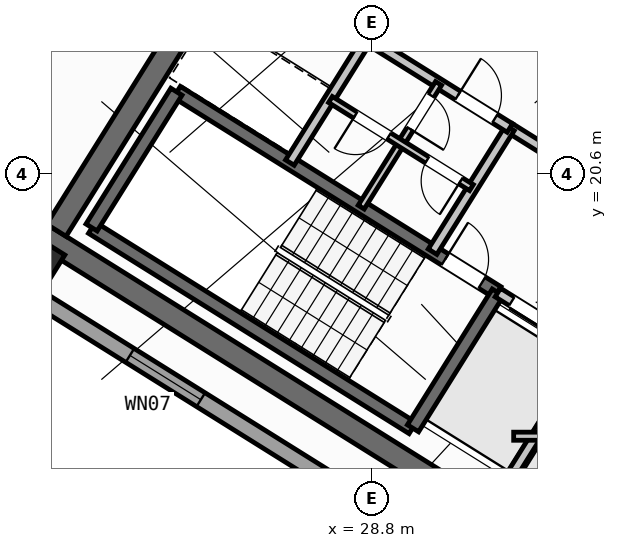
"""IFC4 building model, lengths in metres.
Left out: names, types, materials, properties, quantities, classifications, styles, units other than length and angle.
Written with IfcOpenShell. Run it as: python <this file> out.ifc"""

import sys

from ifc_helpers import new_model, si_unit, direction, frame, frame_2d, origin, origin_2d, place, context, subcontext, project, spatial, rectangle, hollow_rectangle, extrude, source, transform, mapped, element, fill, save


model = new_model("IFC4")
c1 = context("Model", 3, precision=1e-05, world=origin(), true_north=direction((0.0, 1.0)))
c2 = subcontext(c1, "Body", "Model", "MODEL_VIEW")
j1 = project(units=[si_unit("LENGTHUNIT", "METRE"), si_unit("PLANEANGLEUNIT", "RADIAN")], contexts=[c1])
p1 = place(None, origin())
s1 = spatial("IfcSite", under=j1, at=p1, CompositionType="ELEMENT")
p2 = place(p1, origin())
s2 = spatial("IfcBuilding", under=s1, at=p2, CompositionType="ELEMENT")
p3 = place(p2, frame((0.0, 0.0, 218.4)))
s3 = spatial("IfcBuildingStorey", under=s2, at=p3, CompositionType="ELEMENT", Elevation=218.4)
p4 = place(p3, frame((33.324, 12.503, 0.0), z_axis=(0.0, 0.0, 1.0), x_axis=(-0.848043529849, 0.529926571782, 0.0)))
e1 = element("IfcWall", 1, at=p4, inside=s3, PredefinedType="SHEAR", context=c2, shape_type="SweptSolid", body=[
    extrude(rectangle(XDim=13.04, YDim=0.45, at=frame_2d((6.52, 0.0))), origin(), (0.0, 0.0, 1.0), 3.35),
])
p5 = place(p3, frame((26.007, 24.976, 0.0), z_axis=(0.0, 0.0, 1.0), x_axis=(-0.529931155655, -0.848040665456, 0.0)))
e2 = element("IfcWall", 2, at=p5, inside=s3, PredefinedType="SHEAR", context=c2, shape_type="SweptSolid", body=[
    extrude(rectangle(XDim=6.475, YDim=0.45, at=frame_2d((3.238, 0.0))), origin(), (0.0, 0.0, 1.0), 3.35),
])
m1 = source(origin(), c2, "Body", "SweptSolid", [
    extrude(hollow_rectangle(XDim=0.8, YDim=0.8, WallThickness=0.032, at=origin_2d()), origin(), (0.0, 0.0, 1.0), 3.6),
])
p6 = place(p3, frame((22.191, 18.87, 0.0), z_axis=(0.0, 0.0, 1.0), x_axis=(-0.848048096156, 0.529919264233, 0.0)))
e3 = element("IfcColumn", 3, at=p6, inside=s3, PredefinedType="COLUMN", context=c2, shape_type="MappedRepresentation", body=[
    mapped(m1, transform((0.0, 0.0, 0.0), scale=1.0)),
])
p7 = place(p3, frame((31.76, 12.183, 0.0), z_axis=(0.0, 0.0, 1.0), x_axis=(-0.848047074256, 0.529920899612, 0.0)))
e4 = element("IfcWall", 4, at=p7, inside=s3, PredefinedType="STANDARD", context=c2, shape_type="SweptSolid", body=[
    extrude(rectangle(XDim=30.652, YDim=0.32, at=frame_2d((15.326, 0.0))), origin(), (0.0, 0.0, 1.0), 3.35),
])
p8 = place(p7, frame((15.166, 0.0, 0.0)))
e5 = element("IfcOpeningElement", 5, at=p8, cuts=e4, PredefinedType="OPENING", context=c2, shape_type="SweptSolid", body=[
    extrude(rectangle(XDim=1.2, YDim=2.15, at=frame_2d((0.6, 1.075))), frame((0.0, 0.17, 0.0), z_axis=(0.0, -1.0, 0.0), x_axis=(1.0, 0.0, 0.0)), (0.0, 0.0, 1.0), 0.34),
])
p9 = place(p7, frame((2.24, 0.0, 0.9)))
e6 = element("IfcOpeningElement", 6, at=p9, cuts=e4, PredefinedType="OPENING", context=c2, shape_type="SweptSolid", body=[
    extrude(rectangle(XDim=1.65, YDim=1.45, at=frame_2d((0.825, 0.725))), frame((0.0, 0.17, 0.0), z_axis=(0.0, -1.0, 0.0), x_axis=(1.0, 0.0, 0.0)), (0.0, 0.0, 1.0), 0.34),
])
p10 = place(p7, frame((7.469, 0.0, 0.9)))
e7 = element("IfcOpeningElement", 7, at=p10, cuts=e4, PredefinedType="OPENING", context=c2, shape_type="SweptSolid", body=[
    extrude(rectangle(XDim=1.65, YDim=1.45, at=frame_2d((0.825, 0.725))), frame((0.0, 0.17, 0.0), z_axis=(0.0, -1.0, 0.0), x_axis=(1.0, 0.0, 0.0)), (0.0, 0.0, 1.0), 0.34),
])
p11 = place(p7, frame((12.623, 0.0, 1.0)))
e8 = element("IfcOpeningElement", 8, at=p11, cuts=e4, PredefinedType="OPENING", context=c2, shape_type="SweptSolid", body=[
    extrude(rectangle(XDim=0.9, YDim=1.25, at=frame_2d((0.45, 0.625))), frame((0.0, 0.17, 0.0), z_axis=(0.0, -1.0, 0.0), x_axis=(1.0, 0.0, 0.0)), (0.0, 0.0, 1.0), 0.34),
])
p12 = place(p7, frame((19.583, 0.0, 1.0)))
e9 = element("IfcOpeningElement", 9, at=p12, cuts=e4, PredefinedType="OPENING", context=c2, shape_type="SweptSolid", body=[
    extrude(rectangle(XDim=0.9, YDim=1.25, at=frame_2d((0.45, 0.625))), frame((0.0, 0.17, 0.0), z_axis=(0.0, -1.0, 0.0), x_axis=(1.0, 0.0, 0.0)), (0.0, 0.0, 1.0), 0.34),
])
p13 = place(p7, frame((22.033, 0.0, 1.0)))
e10 = element("IfcOpeningElement", 10, at=p13, cuts=e4, PredefinedType="OPENING", context=c2, shape_type="SweptSolid", body=[
    extrude(rectangle(XDim=0.9, YDim=1.25, at=frame_2d((0.45, 0.625))), frame((0.0, 0.17, 0.0), z_axis=(0.0, -1.0, 0.0), x_axis=(1.0, 0.0, 0.0)), (0.0, 0.0, 1.0), 0.34),
])
p14 = place(p7, frame((27.666, 0.0, 0.9)))
e11 = element("IfcOpeningElement", 11, at=p14, cuts=e4, PredefinedType="OPENING", context=c2, shape_type="SweptSolid", body=[
    extrude(rectangle(XDim=1.35, YDim=1.45, at=frame_2d((0.675, 0.725))), frame((0.0, 0.17, 0.0), z_axis=(0.0, -1.0, 0.0), x_axis=(1.0, 0.0, 0.0)), (0.0, 0.0, 1.0), 0.34),
])
p15 = place(p3, frame((29.605, 15.581, 0.0), z_axis=(0.0, 0.0, 1.0), x_axis=(-0.848036911448, 0.529937163087, 0.0)))
e12 = element("IfcWall", 12, at=p15, inside=s3, PredefinedType="SHEAR", context=c2, shape_type="SweptSolid", body=[
    extrude(rectangle(XDim=7.46, YDim=0.26, at=frame_2d((3.73, 0.0))), origin(), (0.0, 0.0, 1.0), 3.35),
])
p16 = place(p3, frame((31.28, 18.261, 0.0), z_axis=(0.0, 0.0, 1.0), x_axis=(-0.848051618787, 0.529913626805, 0.0)))
e13 = element("IfcWall", 13, at=p16, inside=s3, PredefinedType="SHEAR", context=c2, shape_type="SweptSolid", body=[
    extrude(rectangle(XDim=7.46, YDim=0.26, at=frame_2d((3.73, 0.0))), origin(), (0.0, 0.0, 1.0), 3.35),
])
p17 = place(p16, frame((0.36, 0.0, 0.0)))
e14 = element("IfcOpeningElement", 14, at=p17, cuts=e13, PredefinedType="OPENING", context=c2, shape_type="SweptSolid", body=[
    extrude(rectangle(XDim=0.86, YDim=2.05, at=frame_2d((0.43, 1.025))), frame((0.0, 0.14, 0.0), z_axis=(0.0, -1.0, 0.0), x_axis=(1.0, 0.0, 0.0)), (0.0, 0.0, 1.0), 0.28),
])
p18 = place(p3, frame((31.288, 18.256, 0.0), z_axis=(0.0, 0.0, 1.0), x_axis=(-0.529943379326, -0.848033026897, 0.0)))
e15 = element("IfcWall", 15, at=p18, inside=s3, PredefinedType="SHEAR", context=c2, shape_type="SweptSolid", body=[
    extrude(rectangle(XDim=3.16, YDim=0.26, at=frame_2d((1.58, 0.0))), origin(), (0.0, 0.0, 1.0), 3.35),
])
p19 = place(p3, frame((24.945, 22.22, 0.0), z_axis=(0.0, 0.0, 1.0), x_axis=(-0.529908658664, -0.84805472316, 0.0)))
e16 = element("IfcWall", 16, at=p19, inside=s3, PredefinedType="SHEAR", context=c2, shape_type="SweptSolid", body=[
    extrude(rectangle(XDim=3.16, YDim=0.26, at=frame_2d((1.58, 0.0))), origin(), (0.0, 0.0, 1.0), 3.35),
])
p20 = place(p3, frame((38.046, 21.108, 0.0), z_axis=(0.0, 0.0, 1.0), x_axis=(-0.848054434086, 0.529909121291, 0.0)))
e17 = element("IfcWall", 17, at=p20, inside=s3, PredefinedType="SHEAR", context=c2, shape_type="SweptSolid", body=[
    extrude(rectangle(XDim=7.33, YDim=0.26, at=frame_2d((3.665, 0.0))), origin(), (0.0, 0.0, 1.0), 3.35),
])
p21 = place(p20, frame((0.22, 0.0, 0.0)))
e18 = element("IfcOpeningElement", 18, at=p21, cuts=e17, PredefinedType="OPENING", context=c2, shape_type="SweptSolid", body=[
    extrude(rectangle(XDim=1.1, YDim=2.1, at=frame_2d((0.55, 1.05))), frame((0.0, 0.14, 0.0), z_axis=(0.0, -1.0, 0.0), x_axis=(1.0, 0.0, 0.0)), (0.0, 0.0, 1.0), 0.28),
])
p22 = place(p3, frame((34.933, 15.978, 0.0), z_axis=(0.0, 0.0, 1.0), x_axis=(-0.848055739377, 0.529907032327, 0.0)))
e19 = element("IfcWall", 19, at=p22, inside=s3, PredefinedType="STANDARD", context=c2, shape_type="SweptSolid", body=[
    extrude(rectangle(XDim=4.298, YDim=0.2, at=frame_2d((2.149, 0.0))), origin(), (0.0, 0.0, 1.0), 3.34),
])
p23 = place(p22, frame((0.448, 0.0, 0.0)))
e20 = element("IfcOpeningElement", 20, at=p23, cuts=e19, PredefinedType="OPENING", context=c2, shape_type="SweptSolid", body=[
    extrude(rectangle(XDim=1.3, YDim=2.2, at=frame_2d((0.65, 1.1))), frame((0.0, 0.11, 0.0), z_axis=(0.0, -1.0, 0.0), x_axis=(1.0, 0.0, 0.0)), (0.0, 0.0, 1.0), 0.22),
])
p24 = place(p22, frame((2.523, 0.0, 0.0)))
e21 = element("IfcOpeningElement", 21, at=p24, cuts=e19, PredefinedType="OPENING", context=c2, shape_type="SweptSolid", body=[
    extrude(rectangle(XDim=1.45, YDim=2.25, at=frame_2d((0.725, 1.125))), frame((0.0, 0.11, 0.0), z_axis=(0.0, -1.0, 0.0), x_axis=(1.0, 0.0, 0.0)), (0.0, 0.0, 1.0), 0.22),
])
p25 = place(p3, frame((36.459, 18.421, 0.0), z_axis=(0.0, 0.0, 1.0), x_axis=(-0.848059591691, 0.529900867089, 0.0)))
e22 = element("IfcWall", 22, at=p25, inside=s3, PredefinedType="STANDARD", context=c2, shape_type="SweptSolid", body=[
    extrude(rectangle(XDim=5.818, YDim=0.2, at=frame_2d((2.909, 0.0))), origin(), (0.0, 0.0, 1.0), 3.34),
])
p26 = place(p25, frame((2.598, 0.0, 0.0)))
e23 = element("IfcOpeningElement", 23, at=p26, cuts=e22, PredefinedType="OPENING", context=c2, shape_type="SweptSolid", body=[
    extrude(rectangle(XDim=1.15, YDim=2.1, at=frame_2d((0.575, 1.05))), frame((0.0, 0.11, 0.0), z_axis=(0.0, -1.0, 0.0), x_axis=(1.0, 0.0, 0.0)), (0.0, 0.0, 1.0), 0.22),
])
p27 = place(p3, frame((33.029, 17.003, 0.0), z_axis=(0.0, 0.0, 1.0), x_axis=(-0.529916267533, -0.848049968695, 0.0)))
e24 = element("IfcWall", 24, at=p27, inside=s3, PredefinedType="STANDARD", context=c2, shape_type="SweptSolid", body=[
    extrude(rectangle(XDim=2.92, YDim=0.2, at=frame_2d((1.46, 0.0))), origin(), (0.0, 0.0, 1.0), 3.34),
])
for number, where, z_axis, x_axis in (
    (25, (31.525, 21.504, 0.0), (0.0, 0.0, 1.0), (-0.53, -0.848, 0.0)),
    (26, (28.71, 23.263, 0.0), (0.0, 0.0, 1.0), (-0.53, -0.848, 0.0)),
):
    element("IfcWall", number, at=place(p3, frame(where, z_axis=z_axis, x_axis=x_axis)), inside=s3, PredefinedType="STANDARD", context=c2, shape_type="SweptSolid", body=[
        extrude(rectangle(XDim=2.88, YDim=0.2, at=frame_2d((1.44, 0.0))), origin(), (0.0, 0.0, 1.0), 3.34),
    ])
p28 = place(p3, frame((31.525, 21.504, 0.0), z_axis=(0.0, 0.0, 1.0), x_axis=(-0.848042066329, 0.529928913853, 0.0)))
e27 = element("IfcWall", 27, at=p28, inside=s3, PredefinedType="STANDARD", context=c2, shape_type="SweptSolid", body=[
    extrude(rectangle(XDim=6.268, YDim=0.2, at=frame_2d((3.134, 0.0))), origin(), (0.0, 0.0, 1.0), 3.34),
])
p29 = place(p28, frame((4.4, 0.0, 0.0)))
e28 = element("IfcOpeningElement", 28, at=p29, cuts=e27, PredefinedType="OPENING", context=c2, shape_type="SweptSolid", body=[
    extrude(rectangle(XDim=0.86, YDim=2.05, at=frame_2d((0.43, 1.025))), frame((0.0, 0.11, 0.0), z_axis=(0.0, -1.0, 0.0), x_axis=(1.0, 0.0, 0.0)), (0.0, 0.0, 1.0), 0.22),
])
p30 = place(p28, frame((0.35, 0.0, 0.0)))
e29 = element("IfcOpeningElement", 29, at=p30, cuts=e27, PredefinedType="OPENING", context=c2, shape_type="SweptSolid", body=[
    extrude(rectangle(XDim=0.86, YDim=2.05, at=frame_2d((0.43, 1.025))), frame((0.0, 0.11, 0.0), z_axis=(0.0, -1.0, 0.0), x_axis=(1.0, 0.0, 0.0)), (0.0, 0.0, 1.0), 0.22),
])
p31 = place(p3, frame((30.117, 22.384, 0.0), z_axis=(0.0, 0.0, 1.0), x_axis=(-0.529951914384, -0.848027693204, 0.0)))
e30 = element("IfcWall", 30, at=p31, inside=s3, PredefinedType="PLUMBINGWALL", context=c2, shape_type="SweptSolid", body=[
    extrude(rectangle(XDim=1.4, YDim=0.14, at=frame_2d((0.7, 0.0))), origin(), (0.0, 0.0, 1.0), 3.34),
])
p32 = place(p31, frame((0.28, 0.0, 0.0)))
e31 = element("IfcOpeningElement", 31, at=p32, cuts=e30, PredefinedType="OPENING", context=c2, shape_type="SweptSolid", body=[
    extrude(rectangle(XDim=0.78, YDim=2.05, at=frame_2d((0.39, 1.025))), frame((0.0, 0.08, 0.0), z_axis=(0.0, -1.0, 0.0), x_axis=(1.0, 0.0, 0.0)), (0.0, 0.0, 1.0), 0.16),
])
p33 = place(p3, frame((29.375, 21.196, 0.0), z_axis=(0.0, 0.0, 1.0), x_axis=(-0.529865479138, -0.848081702443, 0.0)))
e32 = element("IfcWall", 32, at=p33, inside=s3, PredefinedType="PLUMBINGWALL", context=c2, shape_type="SweptSolid", body=[
    extrude(rectangle(XDim=1.48, YDim=0.14, at=frame_2d((0.74, 0.0))), origin(), (0.0, 0.0, 1.0), 3.34),
])
p34 = place(p3, frame((30.766, 20.327, 0.0), z_axis=(0.0, 0.0, 1.0), x_axis=(-0.848052663127, 0.529911955482, 0.0)))
e33 = element("IfcWall", 33, at=p34, inside=s3, PredefinedType="PLUMBINGWALL", context=c2, shape_type="SweptSolid", body=[
    extrude(rectangle(XDim=3.28, YDim=0.14, at=frame_2d((1.64, 0.0))), origin(), (0.0, 0.0, 1.0), 3.34),
])
p35 = place(p34, frame((0.25, 0.0, 0.0)))
e34 = element("IfcOpeningElement", 34, at=p35, cuts=e33, PredefinedType="OPENING", context=c2, shape_type="SweptSolid", body=[
    extrude(rectangle(XDim=0.78, YDim=2.05, at=frame_2d((0.39, 1.025))), frame((0.0, 0.08, 0.0), z_axis=(0.0, -1.0, 0.0), x_axis=(1.0, 0.0, 0.0)), (0.0, 0.0, 1.0), 0.16),
])
p36 = place(p34, frame((1.92, 0.0, 0.0)))
e35 = element("IfcOpeningElement", 35, at=p36, cuts=e33, PredefinedType="OPENING", context=c2, shape_type="SweptSolid", body=[
    extrude(rectangle(XDim=0.78, YDim=2.05, at=frame_2d((0.39, 1.025))), frame((0.0, 0.08, 0.0), z_axis=(0.0, -1.0, 0.0), x_axis=(1.0, 0.0, 0.0)), (0.0, 0.0, 1.0), 0.16),
])
p37 = place(p3, frame((25.198, 28.606, 0.0), z_axis=(0.0, 0.0, 1.0), x_axis=(-0.529926497642, -0.848043576178, 0.0)))
e36 = element("IfcWall", 36, at=p37, inside=s3, PredefinedType="PARTITIONING", context=c2, shape_type="SweptSolid", body=[
    extrude(rectangle(XDim=10.3, YDim=0.16, at=frame_2d((5.15, 0.0))), origin(), (0.0, 0.0, 1.0), 3.34),
])
p38 = place(p3, frame((31.6, 15.42, 0.0), z_axis=(0.0, 0.0, 1.0), x_axis=(1.0, 0.0, 0.0)))
e37 = element("IfcWall", 37, at=p38, inside=s3, PredefinedType="PARTITIONING", context=c2, shape_type="SweptSolid", body=[
    extrude(rectangle(XDim=2.984, YDim=0.16, at=frame_2d((1.492, 0.0))), origin(), (0.0, 0.0, 1.0), 3.34),
])
m2 = source(origin(), c2, "Body", "SweptSolid", [
    extrude(rectangle(XDim=1.65, YDim=1.45, at=frame_2d((0.825, 0.725))), frame((0.0, 0.03, 0.0), z_axis=(0.0, -1.0, 0.0), x_axis=(1.0, 0.0, 0.0)), (0.0, 0.0, 1.0), 0.06),
])
p39 = place(p10, origin())
e38 = element("IfcWindow", 38, at=p39, inside=s3, PartitioningType="SINGLE_PANEL", PredefinedType="WINDOW", context=c2, shape_type="MappedRepresentation", body=[
    mapped(m2, transform((0.0, 0.0, 0.0), scale=1.0)),
])
fill(e7, e38)
m3 = source(origin(), c2, "Body", "SweptSolid", [
    extrude(rectangle(XDim=0.86, YDim=2.05, at=frame_2d((0.43, 1.025))), frame((0.0, 0.025, 0.0), z_axis=(0.0, -1.0, 0.0), x_axis=(1.0, 0.0, 0.0)), (0.0, 0.0, 1.0), 0.05),
])
p40 = place(p17, frame((0.86, 0.0, 0.0), z_axis=(0.0, 0.0, 1.0), x_axis=(-1.0, 0.0, 0.0)))
e39 = element("IfcDoor", 39, at=p40, inside=s3, OperationType="SINGLE_SWING_LEFT", PredefinedType="DOOR", context=c2, shape_type="MappedRepresentation", body=[
    mapped(m3, transform((0.0, 0.0, 0.0), scale=1.0)),
])
fill(e14, e39)
m4 = source(origin(), c2, "Body", "SweptSolid", [
    extrude(rectangle(XDim=1.45, YDim=2.25, at=frame_2d((0.725, 1.125))), frame((0.0, 0.025, 0.0), z_axis=(0.0, -1.0, 0.0), x_axis=(1.0, 0.0, 0.0)), (0.0, 0.0, 1.0), 0.05),
])
p41 = place(p24, origin())
e40 = element("IfcDoor", 40, at=p41, inside=s3, OperationType="DOUBLE_DOOR_SLIDING", PredefinedType="DOOR", context=c2, shape_type="MappedRepresentation", body=[
    mapped(m4, transform((0.0, 0.0, 0.0), scale=1.0)),
])
fill(e21, e40)
p42 = place(p30, frame((0.86, 0.0, 0.0), z_axis=(0.0, 0.0, 1.0), x_axis=(-1.0, 0.0, 0.0)))
e41 = element("IfcDoor", 41, at=p42, inside=s3, OperationType="SINGLE_SWING_LEFT", PredefinedType="DOOR", context=c2, shape_type="MappedRepresentation", body=[
    mapped(m3, transform((0.0, 0.0, 0.0), scale=1.0)),
])
fill(e29, e41)
m5 = source(origin(), c2, "Body", "SweptSolid", [
    extrude(rectangle(XDim=0.78, YDim=2.05, at=frame_2d((0.39, 1.025))), frame((0.0, 0.025, 0.0), z_axis=(0.0, -1.0, 0.0), x_axis=(1.0, 0.0, 0.0)), (0.0, 0.0, 1.0), 0.05),
])
p43 = place(p32, origin())
e42 = element("IfcDoor", 42, at=p43, inside=s3, OperationType="SINGLE_SWING_RIGHT", PredefinedType="DOOR", context=c2, shape_type="MappedRepresentation", body=[
    mapped(m5, transform((0.0, 0.0, 0.0), scale=1.0)),
])
fill(e31, e42)
p44 = place(p35, origin())
e43 = element("IfcDoor", 43, at=p44, inside=s3, OperationType="SINGLE_SWING_LEFT", PredefinedType="DOOR", context=c2, shape_type="MappedRepresentation", body=[
    mapped(m5, transform((0.0, 0.0, 0.0), scale=1.0)),
])
fill(e34, e43)
p45 = place(p36, origin())
e44 = element("IfcDoor", 44, at=p45, inside=s3, OperationType="SINGLE_SWING_RIGHT", PredefinedType="DOOR", context=c2, shape_type="MappedRepresentation", body=[
    mapped(m5, transform((0.0, 0.0, 0.0), scale=1.0)),
])
fill(e35, e44)
save(model, sys.argv[1])
